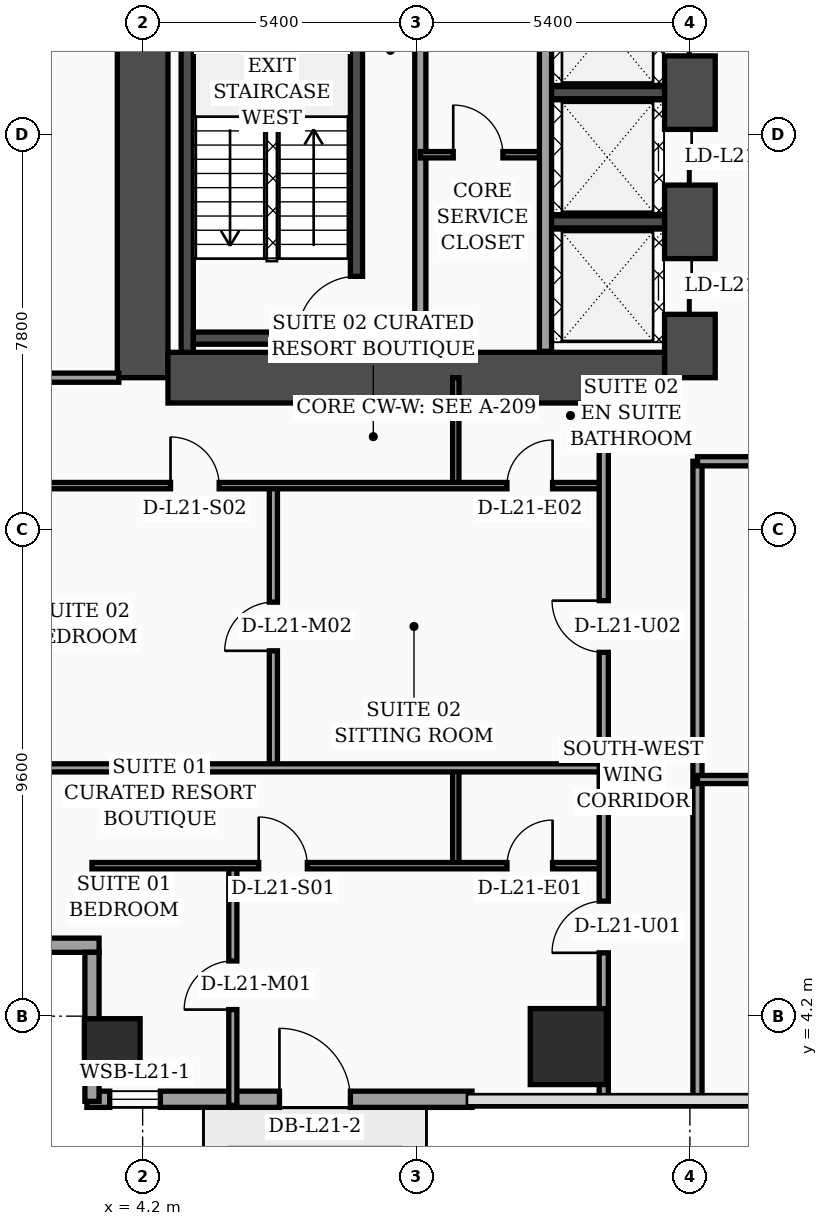
"""IFC4 building model, lengths in metres.
Left out: names, types, materials, properties, quantities, classifications, styles, units other than length and angle.
Written with IfcOpenShell. Run it as: python <this file> out.ifc"""

import sys

from ifc_helpers import new_model, si_unit, direction, frame, frame_2d, origin, origin_2d, place, context, subcontext, project, spatial, rectangle, hollow_rectangle, extrude, element, fill, save


model = new_model("IFC4")
c1 = context("Model", 3, precision=1e-05, world=origin(), true_north=direction((0.0, 1.0)))
c2 = subcontext(c1, "Body", "Model", "MODEL_VIEW")
j1 = project(units=[si_unit("LENGTHUNIT", "METRE"), si_unit("PLANEANGLEUNIT", "RADIAN")], contexts=[c1])
p1 = place(None, origin())
s1 = spatial("IfcSite", under=j1, at=p1, CompositionType="ELEMENT")
p2 = place(p1, origin())
s2 = spatial("IfcBuilding", under=s1, at=p2, CompositionType="ELEMENT")
p3 = place(p2, frame((0.0, 0.0, 88.8)))
s3 = spatial("IfcBuildingStorey", under=s2, at=p3, CompositionType="ELEMENT", Elevation=88.8)
p4 = place(p3, frame((4.2, 16.8, 0.0), z_axis=(0.0, 0.0, 1.0), x_axis=(0.0, 1.0, 0.0)))
e1 = element("IfcWall", 1, at=p4, inside=s3, PredefinedType="SHEAR", context=c2, shape_type="SweptSolid", body=[
    extrude(rectangle(XDim=21.6, YDim=1.0, at=frame_2d((10.8, 0.0))), origin(), (0.0, 0.0, 1.0), 3.52),
])
p5 = place(p3, frame((15.0, 16.8, 0.0), z_axis=(0.0, 0.0, 1.0), x_axis=(0.0, 1.0, 0.0)))
e2 = element("IfcWall", 2, at=p5, inside=s3, PredefinedType="SHEAR", context=c2, shape_type="SweptSolid", body=[
    extrude(rectangle(XDim=21.6, YDim=1.0, at=frame_2d((10.8, 0.0))), origin(), (0.0, 0.0, 1.0), 3.52),
])
p6 = place(p5, frame((8.65, 0.0, 0.0)))
e3 = element("IfcOpeningElement", 3, at=p6, cuts=e2, PredefinedType="OPENING", context=c2, shape_type="SweptSolid", body=[
    extrude(rectangle(XDim=1.1, YDim=2.2, at=frame_2d((0.55, 1.1))), frame((0.0, 0.51, 0.0), z_axis=(0.0, -1.0, 0.0), x_axis=(1.0, 0.0, 0.0)), (0.0, 0.0, 1.0), 1.02),
])
p7 = place(p5, frame((1.25, 0.0, 0.0)))
e4 = element("IfcOpeningElement", 4, at=p7, cuts=e2, PredefinedType="OPENING", context=c2, shape_type="SweptSolid", body=[
    extrude(rectangle(XDim=1.1, YDim=2.2, at=frame_2d((0.55, 1.1))), frame((0.0, 0.51, 0.0), z_axis=(0.0, -1.0, 0.0), x_axis=(1.0, 0.0, 0.0)), (0.0, 0.0, 1.0), 1.02),
])
p8 = place(p5, frame((3.8, 0.0, 0.0)))
e5 = element("IfcOpeningElement", 5, at=p8, cuts=e2, PredefinedType="OPENING", context=c2, shape_type="SweptSolid", body=[
    extrude(rectangle(XDim=1.1, YDim=2.2, at=frame_2d((0.55, 1.1))), frame((0.0, 0.51, 0.0), z_axis=(0.0, -1.0, 0.0), x_axis=(1.0, 0.0, 0.0)), (0.0, 0.0, 1.0), 1.02),
])
p9 = place(p5, frame((6.35, 0.0, 0.0)))
e6 = element("IfcOpeningElement", 6, at=p9, cuts=e2, PredefinedType="OPENING", context=c2, shape_type="SweptSolid", body=[
    extrude(rectangle(XDim=1.1, YDim=2.2, at=frame_2d((0.55, 1.1))), frame((0.0, 0.51, 0.0), z_axis=(0.0, -1.0, 0.0), x_axis=(1.0, 0.0, 0.0)), (0.0, 0.0, 1.0), 1.02),
])
p10 = place(p3, frame((4.7, 16.8, 0.0), z_axis=(0.0, 0.0, 1.0), x_axis=(1.0, 0.0, 0.0)))
e7 = element("IfcWall", 7, at=p10, inside=s3, PredefinedType="SHEAR", context=c2, shape_type="SweptSolid", body=[
    extrude(rectangle(XDim=9.8, YDim=1.0, at=frame_2d((4.9, 0.0))), origin(), (0.0, 0.0, 1.0), 3.52),
])
p11 = place(p3, frame((5.08, 17.3, 0.0), z_axis=(0.0, 0.0, 1.0), x_axis=(0.0, 1.0, 0.0)))
e8 = element("IfcWall", 8, at=p11, inside=s3, PredefinedType="SOLIDWALL", context=c2, shape_type="SweptSolid", body=[
    extrude(rectangle(XDim=9.49, YDim=0.24, at=frame_2d((4.745, 0.0))), origin(), (0.0, 0.0, 1.0), 3.52),
])
p12 = place(p3, frame((8.42, 17.3, 0.0), z_axis=(0.0, 0.0, 1.0), x_axis=(0.0, 1.0, 0.0)))
e9 = element("IfcWall", 9, at=p12, inside=s3, PredefinedType="SOLIDWALL", context=c2, shape_type="SweptSolid", body=[
    extrude(rectangle(XDim=9.49, YDim=0.24, at=frame_2d((4.745, 0.0))), origin(), (0.0, 0.0, 1.0), 3.52),
])
p13 = place(p12, frame((0.35, 0.0, 0.0)))
e10 = element("IfcOpeningElement", 10, at=p13, cuts=e9, PredefinedType="OPENING", context=c2, shape_type="SweptSolid", body=[
    extrude(rectangle(XDim=1.15, YDim=2.2, at=frame_2d((0.575, 1.1))), frame((0.0, 0.13, 0.0), z_axis=(0.0, -1.0, 0.0), x_axis=(1.0, 0.0, 0.0)), (0.0, 0.0, 1.0), 0.26),
])
p14 = place(p3, frame((5.2, 17.58, 0.0), z_axis=(0.0, 0.0, 1.0), x_axis=(1.0, 0.0, 0.0)))
e11 = element("IfcWall", 11, at=p14, inside=s3, PredefinedType="SOLIDWALL", context=c2, shape_type="SweptSolid", body=[
    extrude(rectangle(XDim=3.1, YDim=0.24, at=frame_2d((1.55, 0.0))), origin(), (0.0, 0.0, 1.0), 3.52),
])
for number, where, z_axis, x_axis in (
    (12, (12.18, 19.875, 0.0), (0.0, 0.0, 1.0), (1.0, 0.0, 0.0)),
    (13, (12.18, 22.425, 0.0), (0.0, 0.0, 1.0), (1.0, 0.0, 0.0)),
):
    element("IfcWall", number, at=place(p3, frame(where, z_axis=z_axis, x_axis=x_axis)), inside=s3, PredefinedType="SOLIDWALL", context=c2, shape_type="SweptSolid", body=[
        extrude(rectangle(XDim=2.32, YDim=0.24, at=frame_2d((1.16, 0.0))), origin(), (0.0, 0.0, 1.0), 3.52),
    ])
p15 = place(p3, frame((3.6, 3.6, 0.0), z_axis=(0.0, 0.0, 1.0), x_axis=(1.0, 0.0, 0.0)))
e14 = element("IfcColumn", 14, at=p15, inside=s3, PredefinedType="COLUMN", context=c2, shape_type="SweptSolid", body=[
    extrude(hollow_rectangle(XDim=1.1, YDim=1.1, WallThickness=0.045, at=origin_2d()), origin(), (0.0, 0.0, 1.0), 3.52),
])
p16 = place(p3, frame((12.6, 3.6, 0.0), z_axis=(0.0, 0.0, 1.0), x_axis=(1.0, 0.0, 0.0)))
e15 = element("IfcColumn", 15, at=p16, inside=s3, PredefinedType="COLUMN", context=c2, shape_type="SweptSolid", body=[
    extrude(rectangle(XDim=1.5, YDim=1.5, at=origin_2d()), origin(), (0.0, 0.0, 1.0), 3.52),
])
p17 = place(p3, frame((3.1, 2.56, 0.0), z_axis=(0.0, 0.0, 1.0), x_axis=(1.0, 0.0, 0.0)))
e16 = element("IfcWall", 16, at=p17, inside=s3, PredefinedType="SOLIDWALL", context=c2, shape_type="SweptSolid", body=[
    extrude(rectangle(XDim=7.6, YDim=0.32, at=frame_2d((3.8, 0.0))), origin(), (0.0, 0.0, 1.0), 3.52),
])
p18 = place(p17, frame((0.45, 0.0, 0.75)))
e17 = element("IfcOpeningElement", 17, at=p18, cuts=e16, PredefinedType="OPENING", context=c2, shape_type="SweptSolid", body=[
    extrude(rectangle(XDim=1.0, YDim=1.6, at=frame_2d((0.5, 0.8))), frame((0.0, 0.17, 0.0), z_axis=(0.0, -1.0, 0.0), x_axis=(1.0, 0.0, 0.0)), (0.0, 0.0, 1.0), 0.34),
])
p19 = place(p17, frame((3.8, 0.0, 0.0)))
e18 = element("IfcOpeningElement", 18, at=p19, cuts=e16, PredefinedType="OPENING", context=c2, shape_type="SweptSolid", body=[
    extrude(rectangle(XDim=1.4, YDim=2.25, at=frame_2d((0.7, 1.125))), frame((0.0, 0.17, 0.0), z_axis=(0.0, -1.0, 0.0), x_axis=(1.0, 0.0, 0.0)), (0.0, 0.0, 1.0), 0.34),
])
p20 = place(p3, frame((0.12, 5.6, 0.0), z_axis=(0.0, 0.0, 1.0), x_axis=(1.0, 0.0, 0.0)))
e19 = element("IfcWall", 19, at=p20, inside=s3, PredefinedType="SOLIDWALL", context=c2, shape_type="SweptSolid", body=[
    extrude(rectangle(XDim=3.22, YDim=0.28, at=frame_2d((1.61, 0.0))), origin(), (0.0, 0.0, 1.0), 2.82),
])
p21 = place(p3, frame((3.2, 5.46, 0.0), z_axis=(0.0, 0.0, 1.0), x_axis=(0.0, -1.0, 0.0)))
e20 = element("IfcWall", 20, at=p21, inside=s3, PredefinedType="SOLIDWALL", context=c2, shape_type="SweptSolid", body=[
    extrude(rectangle(XDim=2.94, YDim=0.28, at=frame_2d((1.47, 0.0))), origin(), (0.0, 0.0, 1.0), 2.82),
])
p22 = place(p3, frame((9.68, 17.32, 0.0), z_axis=(0.0, 0.0, 1.0), x_axis=(0.0, 1.0, 0.0)))
e21 = element("IfcWall", 21, at=p22, inside=s3, PredefinedType="SOLIDWALL", context=c2, shape_type="SweptSolid", body=[
    extrude(rectangle(XDim=7.68, YDim=0.22, at=frame_2d((3.84, 0.0))), origin(), (0.0, 0.0, 1.0), 3.52),
])
p23 = place(p3, frame((9.68, 21.2, 0.0), z_axis=(0.0, 0.0, 1.0), x_axis=(1.0, 0.0, 0.0)))
e22 = element("IfcWall", 22, at=p23, inside=s3, PredefinedType="PARTITIONING", context=c2, shape_type="SweptSolid", body=[
    extrude(rectangle(XDim=2.47, YDim=0.125, at=frame_2d((1.235, 0.0))), origin(), (0.0, 0.0, 1.0), 3.52),
])
p24 = place(p23, frame((0.65, 0.0, 0.0)))
e23 = element("IfcOpeningElement", 23, at=p24, cuts=e22, PredefinedType="OPENING", context=c2, shape_type="SweptSolid", body=[
    extrude(rectangle(XDim=0.98, YDim=2.15, at=frame_2d((0.49, 1.075))), frame((0.0, 0.073, 0.0), z_axis=(0.0, -1.0, 0.0), x_axis=(1.0, 0.0, 0.0)), (0.0, 0.0, 1.0), 0.145),
])
p25 = place(p3, frame((12.15, 17.32, 0.0), z_axis=(0.0, 0.0, 1.0), x_axis=(0.0, 1.0, 0.0)))
e24 = element("IfcWall", 24, at=p25, inside=s3, PredefinedType="SOLIDWALL", context=c2, shape_type="SweptSolid", body=[
    extrude(rectangle(XDim=7.65, YDim=0.24, at=frame_2d((3.825, 0.0))), origin(), (0.0, 0.0, 1.0), 3.52),
])
p26 = place(p3, frame((0.08, 16.8, 0.0), z_axis=(0.0, 0.0, 1.0), x_axis=(1.0, 0.0, 0.0)))
e25 = element("IfcWall", 25, at=p26, inside=s3, PredefinedType="PARTITIONING", context=c2, shape_type="SweptSolid", body=[
    extrude(rectangle(XDim=3.65, YDim=0.18, at=frame_2d((1.825, 0.0))), origin(), (0.0, 0.0, 1.0), 2.82),
])
p27 = place(p3, frame((10.38, 7.17, 0.0), z_axis=(0.0, 0.0, 1.0), x_axis=(0.0, 1.0, 0.0)))
e26 = element("IfcWall", 26, at=p27, inside=s3, PredefinedType="PARTITIONING", context=c2, shape_type="SweptSolid", body=[
    extrude(rectangle(XDim=1.93, YDim=0.125, at=frame_2d((0.965, 0.0))), origin(), (0.0, 0.0, 1.0), 3.52),
])
p28 = place(p3, frame((5.98, 2.44, 0.0), z_axis=(0.0, 0.0, 1.0), x_axis=(0.0, 1.0, 0.0)))
e27 = element("IfcWall", 27, at=p28, inside=s3, PredefinedType="PARTITIONING", context=c2, shape_type="SweptSolid", body=[
    extrude(rectangle(XDim=4.73, YDim=0.16, at=frame_2d((2.365, 0.0))), origin(), (0.0, 0.0, 1.0), 3.02),
])
p29 = place(p28, frame((1.89, 0.0, 0.0)))
e28 = element("IfcOpeningElement", 28, at=p29, cuts=e27, PredefinedType="OPENING", context=c2, shape_type="SweptSolid", body=[
    extrude(rectangle(XDim=0.96, YDim=2.2, at=frame_2d((0.48, 1.1))), frame((0.0, 0.09, 0.0), z_axis=(0.0, -1.0, 0.0), x_axis=(1.0, 0.0, 0.0)), (0.0, 0.0, 1.0), 0.18),
])
p30 = place(p3, frame((3.2, 7.17, 0.0), z_axis=(0.0, 0.0, 1.0), x_axis=(1.0, 0.0, 0.0)))
e29 = element("IfcWall", 29, at=p30, inside=s3, PredefinedType="PARTITIONING", context=c2, shape_type="SweptSolid", body=[
    extrude(rectangle(XDim=10.1, YDim=0.125, at=frame_2d((5.05, 0.0))), origin(), (0.0, 0.0, 1.0), 2.82),
])
p31 = place(p30, frame((3.29, 0.0, 0.0)))
e30 = element("IfcOpeningElement", 30, at=p31, cuts=e29, PredefinedType="OPENING", context=c2, shape_type="SweptSolid", body=[
    extrude(rectangle(XDim=0.96, YDim=2.2, at=frame_2d((0.48, 1.1))), frame((0.0, 0.073, 0.0), z_axis=(0.0, -1.0, 0.0), x_axis=(1.0, 0.0, 0.0)), (0.0, 0.0, 1.0), 0.145),
])
p32 = place(p30, frame((8.19, 0.0, 0.0)))
e31 = element("IfcOpeningElement", 31, at=p32, cuts=e29, PredefinedType="OPENING", context=c2, shape_type="SweptSolid", body=[
    extrude(rectangle(XDim=0.9, YDim=2.15, at=frame_2d((0.45, 1.075))), frame((0.0, 0.073, 0.0), z_axis=(0.0, -1.0, 0.0), x_axis=(1.0, 0.0, 0.0)), (0.0, 0.0, 1.0), 0.145),
])
p33 = place(p3, frame((10.38, 14.67, 0.0), z_axis=(0.0, 0.0, 1.0), x_axis=(0.0, 1.0, 0.0)))
e32 = element("IfcWall", 32, at=p33, inside=s3, PredefinedType="PARTITIONING", context=c2, shape_type="SweptSolid", body=[
    extrude(rectangle(XDim=2.13, YDim=0.125, at=frame_2d((1.065, 0.0))), origin(), (0.0, 0.0, 1.0), 3.52),
])
p34 = place(p3, frame((6.78, 9.1, 0.0), z_axis=(0.0, 0.0, 1.0), x_axis=(0.0, 1.0, 0.0)))
e33 = element("IfcWall", 33, at=p34, inside=s3, PredefinedType="PARTITIONING", context=c2, shape_type="SweptSolid", body=[
    extrude(rectangle(XDim=5.57, YDim=0.16, at=frame_2d((2.785, 0.0))), origin(), (0.0, 0.0, 1.0), 3.12),
])
p35 = place(p34, frame((2.31, 0.0, 0.0)))
e34 = element("IfcOpeningElement", 34, at=p35, cuts=e33, PredefinedType="OPENING", context=c2, shape_type="SweptSolid", body=[
    extrude(rectangle(XDim=0.96, YDim=2.2, at=frame_2d((0.48, 1.1))), frame((0.0, 0.09, 0.0), z_axis=(0.0, -1.0, 0.0), x_axis=(1.0, 0.0, 0.0)), (0.0, 0.0, 1.0), 0.18),
])
p36 = place(p3, frame((0.08, 14.67, 0.0), z_axis=(0.0, 0.0, 1.0), x_axis=(1.0, 0.0, 0.0)))
e35 = element("IfcWall", 35, at=p36, inside=s3, PredefinedType="PARTITIONING", context=c2, shape_type="SweptSolid", body=[
    extrude(rectangle(XDim=13.22, YDim=0.125, at=frame_2d((6.61, 0.0))), origin(), (0.0, 0.0, 1.0), 2.82),
])
p37 = place(p36, frame((4.67, 0.0, 0.0)))
e36 = element("IfcOpeningElement", 36, at=p37, cuts=e35, PredefinedType="OPENING", context=c2, shape_type="SweptSolid", body=[
    extrude(rectangle(XDim=0.96, YDim=2.2, at=frame_2d((0.48, 1.1))), frame((0.0, 0.073, 0.0), z_axis=(0.0, -1.0, 0.0), x_axis=(1.0, 0.0, 0.0)), (0.0, 0.0, 1.0), 0.145),
])
p38 = place(p36, frame((11.31, 0.0, 0.0)))
e37 = element("IfcOpeningElement", 37, at=p38, cuts=e35, PredefinedType="OPENING", context=c2, shape_type="SweptSolid", body=[
    extrude(rectangle(XDim=0.9, YDim=2.15, at=frame_2d((0.45, 1.075))), frame((0.0, 0.073, 0.0), z_axis=(0.0, -1.0, 0.0), x_axis=(1.0, 0.0, 0.0)), (0.0, 0.0, 1.0), 0.145),
])
p39 = place(p3, frame((0.08, 9.1, 0.0), z_axis=(0.0, 0.0, 1.0), x_axis=(1.0, 0.0, 0.0)))
e38 = element("IfcWall", 38, at=p39, inside=s3, PredefinedType="PARTITIONING", context=c2, shape_type="SweptSolid", body=[
    extrude(rectangle(XDim=13.22, YDim=0.16, at=frame_2d((6.61, 0.0))), origin(), (0.0, 0.0, 1.0), 2.82),
])
p40 = place(p3, frame((13.3, 2.44, 0.0), z_axis=(0.0, 0.0, 1.0), x_axis=(0.0, 1.0, 0.0)))
e39 = element("IfcWall", 39, at=p40, inside=s3, PredefinedType="PARTITIONING", context=c2, shape_type="SweptSolid", body=[
    extrude(rectangle(XDim=14.36, YDim=0.18, at=frame_2d((7.18, 0.0))), origin(), (0.0, 0.0, 1.0), 3.02),
])
p41 = place(p40, frame((3.01, 0.0, 0.0)))
e40 = element("IfcOpeningElement", 40, at=p41, cuts=e39, PredefinedType="OPENING", context=c2, shape_type="SweptSolid", body=[
    extrude(rectangle(XDim=1.02, YDim=2.2, at=frame_2d((0.51, 1.1))), frame((0.0, 0.1, 0.0), z_axis=(0.0, -1.0, 0.0), x_axis=(1.0, 0.0, 0.0)), (0.0, 0.0, 1.0), 0.2),
])
p42 = place(p40, frame((8.94, 0.0, 0.0)))
e41 = element("IfcOpeningElement", 41, at=p42, cuts=e39, PredefinedType="OPENING", context=c2, shape_type="SweptSolid", body=[
    extrude(rectangle(XDim=1.02, YDim=2.2, at=frame_2d((0.51, 1.1))), frame((0.0, 0.1, 0.0), z_axis=(0.0, -1.0, 0.0), x_axis=(1.0, 0.0, 0.0)), (0.0, 0.0, 1.0), 0.2),
])
p43 = place(p3, frame((15.15, 2.44, 0.0), z_axis=(0.0, 0.0, 1.0), x_axis=(0.0, 1.0, 0.0)))
e42 = element("IfcWall", 42, at=p43, inside=s3, PredefinedType="PARTITIONING", context=c2, shape_type="SweptSolid", body=[
    extrude(rectangle(XDim=12.71, YDim=0.18, at=frame_2d((6.355, 0.0))), origin(), (0.0, 0.0, 1.0), 3.02),
])
p44 = place(p3, frame((15.15, 8.87, 0.0), z_axis=(0.0, 0.0, 1.0), x_axis=(1.0, 0.0, 0.0)))
e43 = element("IfcWall", 43, at=p44, inside=s3, PredefinedType="PARTITIONING", context=c2, shape_type="SweptSolid", body=[
    extrude(rectangle(XDim=4.45, YDim=0.16, at=frame_2d((2.225, 0.0))), origin(), (0.0, 0.0, 1.0), 3.52),
])
p45 = place(p44, frame((1.75, 0.0, 0.0)))
e44 = element("IfcOpeningElement", 44, at=p45, cuts=e43, PredefinedType="OPENING", context=c2, shape_type="SweptSolid", body=[
    extrude(rectangle(XDim=0.96, YDim=2.2, at=frame_2d((0.48, 1.1))), frame((0.0, 0.09, 0.0), z_axis=(0.0, -1.0, 0.0), x_axis=(1.0, 0.0, 0.0)), (0.0, 0.0, 1.0), 0.18),
])
p46 = place(p3, frame((15.15, 15.15, 0.0), z_axis=(0.0, 0.0, 1.0), x_axis=(1.0, 0.0, 0.0)))
e45 = element("IfcWall", 45, at=p46, inside=s3, PredefinedType="PARTITIONING", context=c2, shape_type="SweptSolid", body=[
    extrude(rectangle(XDim=6.45, YDim=0.18, at=frame_2d((3.225, 0.0))), origin(), (0.0, 0.0, 1.0), 2.32),
])
p47 = place(p46, frame((1.74, 0.0, 0.0)))
e46 = element("IfcOpeningElement", 46, at=p47, cuts=e45, PredefinedType="OPENING", context=c2, shape_type="SweptSolid", body=[
    extrude(rectangle(XDim=1.02, YDim=2.2, at=frame_2d((0.51, 1.1))), frame((0.0, 0.1, 0.0), z_axis=(0.0, -1.0, 0.0), x_axis=(1.0, 0.0, 0.0)), (0.0, 0.0, 1.0), 0.2),
])
p48 = place(p18, origin())
e47 = element("IfcWindow", 47, at=p48, inside=s3, PartitioningType="SINGLE_PANEL", PredefinedType="WINDOW", context=c2, shape_type="SweptSolid", body=[
    extrude(rectangle(XDim=1.0, YDim=1.6, at=frame_2d((0.5, 0.8))), frame((0.0, 0.03, 0.0), z_axis=(0.0, -1.0, 0.0), x_axis=(1.0, 0.0, 0.0)), (0.0, 0.0, 1.0), 0.06),
])
fill(e17, e47)
p49 = place(p19, origin())
e48 = element("IfcDoor", 48, at=p49, inside=s3, OperationType="SINGLE_SWING_LEFT", PredefinedType="DOOR", context=c2, shape_type="SweptSolid", body=[
    extrude(rectangle(XDim=1.4, YDim=2.25, at=frame_2d((0.7, 1.125))), frame((0.0, 0.025, 0.0), z_axis=(0.0, -1.0, 0.0), x_axis=(1.0, 0.0, 0.0)), (0.0, 0.0, 1.0), 0.05),
])
fill(e18, e48)
p50 = place(p24, origin())
e49 = element("IfcDoor", 49, at=p50, inside=s3, OperationType="SINGLE_SWING_LEFT", PredefinedType="DOOR", context=c2, shape_type="SweptSolid", body=[
    extrude(rectangle(XDim=0.98, YDim=2.15, at=frame_2d((0.49, 1.075))), frame((0.0, 0.025, 0.0), z_axis=(0.0, -1.0, 0.0), x_axis=(1.0, 0.0, 0.0)), (0.0, 0.0, 1.0), 0.05),
])
fill(e23, e49)
p51 = place(p29, origin())
e50 = element("IfcDoor", 50, at=p51, inside=s3, OperationType="SINGLE_SWING_LEFT", PredefinedType="DOOR", context=c2, shape_type="SweptSolid", body=[
    extrude(rectangle(XDim=0.96, YDim=2.2, at=frame_2d((0.48, 1.1))), frame((0.0, 0.025, 0.0), z_axis=(0.0, -1.0, 0.0), x_axis=(1.0, 0.0, 0.0)), (0.0, 0.0, 1.0), 0.05),
])
fill(e28, e50)
p52 = place(p31, origin())
e51 = element("IfcDoor", 51, at=p52, inside=s3, OperationType="SINGLE_SWING_LEFT", PredefinedType="DOOR", context=c2, shape_type="SweptSolid", body=[
    extrude(rectangle(XDim=0.96, YDim=2.2, at=frame_2d((0.48, 1.1))), frame((0.0, 0.025, 0.0), z_axis=(0.0, -1.0, 0.0), x_axis=(1.0, 0.0, 0.0)), (0.0, 0.0, 1.0), 0.05),
])
fill(e30, e51)
p53 = place(p32, origin())
e52 = element("IfcDoor", 52, at=p53, inside=s3, OperationType="SINGLE_SWING_RIGHT", PredefinedType="DOOR", context=c2, shape_type="SweptSolid", body=[
    extrude(rectangle(XDim=0.9, YDim=2.15, at=frame_2d((0.45, 1.075))), frame((0.0, 0.025, 0.0), z_axis=(0.0, -1.0, 0.0), x_axis=(1.0, 0.0, 0.0)), (0.0, 0.0, 1.0), 0.05),
])
fill(e31, e52)
p54 = place(p35, origin())
e53 = element("IfcDoor", 53, at=p54, inside=s3, OperationType="SINGLE_SWING_LEFT", PredefinedType="DOOR", context=c2, shape_type="SweptSolid", body=[
    extrude(rectangle(XDim=0.96, YDim=2.2, at=frame_2d((0.48, 1.1))), frame((0.0, 0.025, 0.0), z_axis=(0.0, -1.0, 0.0), x_axis=(1.0, 0.0, 0.0)), (0.0, 0.0, 1.0), 0.05),
])
fill(e34, e53)
p55 = place(p37, origin())
e54 = element("IfcDoor", 54, at=p55, inside=s3, OperationType="SINGLE_SWING_LEFT", PredefinedType="DOOR", context=c2, shape_type="SweptSolid", body=[
    extrude(rectangle(XDim=0.96, YDim=2.2, at=frame_2d((0.48, 1.1))), frame((0.0, 0.025, 0.0), z_axis=(0.0, -1.0, 0.0), x_axis=(1.0, 0.0, 0.0)), (0.0, 0.0, 1.0), 0.05),
])
fill(e36, e54)
p56 = place(p38, origin())
e55 = element("IfcDoor", 55, at=p56, inside=s3, OperationType="SINGLE_SWING_RIGHT", PredefinedType="DOOR", context=c2, shape_type="SweptSolid", body=[
    extrude(rectangle(XDim=0.9, YDim=2.15, at=frame_2d((0.45, 1.075))), frame((0.0, 0.025, 0.0), z_axis=(0.0, -1.0, 0.0), x_axis=(1.0, 0.0, 0.0)), (0.0, 0.0, 1.0), 0.05),
])
fill(e37, e55)
p57 = place(p41, origin())
e56 = element("IfcDoor", 56, at=p57, inside=s3, OperationType="SINGLE_SWING_LEFT", PredefinedType="DOOR", context=c2, shape_type="SweptSolid", body=[
    extrude(rectangle(XDim=1.02, YDim=2.2, at=frame_2d((0.51, 1.1))), frame((0.0, 0.025, 0.0), z_axis=(0.0, -1.0, 0.0), x_axis=(1.0, 0.0, 0.0)), (0.0, 0.0, 1.0), 0.05),
])
fill(e40, e56)
p58 = place(p42, origin())
e57 = element("IfcDoor", 57, at=p58, inside=s3, OperationType="SINGLE_SWING_RIGHT", PredefinedType="DOOR", context=c2, shape_type="SweptSolid", body=[
    extrude(rectangle(XDim=1.02, YDim=2.2, at=frame_2d((0.51, 1.1))), frame((0.0, 0.025, 0.0), z_axis=(0.0, -1.0, 0.0), x_axis=(1.0, 0.0, 0.0)), (0.0, 0.0, 1.0), 0.05),
])
fill(e41, e57)
p59 = place(p13, origin())
e58 = element("IfcDoor", 58, at=p59, inside=s3, OperationType="SINGLE_SWING_LEFT", PredefinedType="DOOR", context=c2, shape_type="SweptSolid", body=[
    extrude(rectangle(XDim=1.15, YDim=2.2, at=frame_2d((0.575, 1.1))), frame((0.0, 0.025, 0.0), z_axis=(0.0, -1.0, 0.0), x_axis=(1.0, 0.0, 0.0)), (0.0, 0.0, 1.0), 0.05),
])
fill(e10, e58)
p60 = place(p7, origin())
e59 = element("IfcDoor", 59, at=p60, inside=s3, OperationType="DOUBLE_DOOR_SLIDING", PredefinedType="DOOR", context=c2, shape_type="SweptSolid", body=[
    extrude(rectangle(XDim=1.1, YDim=2.2, at=frame_2d((0.55, 1.1))), frame((0.0, 0.025, 0.0), z_axis=(0.0, -1.0, 0.0), x_axis=(1.0, 0.0, 0.0)), (0.0, 0.0, 1.0), 0.05),
])
fill(e4, e59)
p61 = place(p8, origin())
e60 = element("IfcDoor", 60, at=p61, inside=s3, OperationType="DOUBLE_DOOR_SLIDING", PredefinedType="DOOR", context=c2, shape_type="SweptSolid", body=[
    extrude(rectangle(XDim=1.1, YDim=2.2, at=frame_2d((0.55, 1.1))), frame((0.0, 0.025, 0.0), z_axis=(0.0, -1.0, 0.0), x_axis=(1.0, 0.0, 0.0)), (0.0, 0.0, 1.0), 0.05),
])
fill(e5, e60)
p62 = place(p9, origin())
e61 = element("IfcDoor", 61, at=p62, inside=s3, OperationType="DOUBLE_DOOR_SLIDING", PredefinedType="DOOR", context=c2, shape_type="SweptSolid", body=[
    extrude(rectangle(XDim=1.1, YDim=2.2, at=frame_2d((0.55, 1.1))), frame((0.0, 0.025, 0.0), z_axis=(0.0, -1.0, 0.0), x_axis=(1.0, 0.0, 0.0)), (0.0, 0.0, 1.0), 0.05),
])
fill(e6, e61)
save(model, sys.argv[1])
